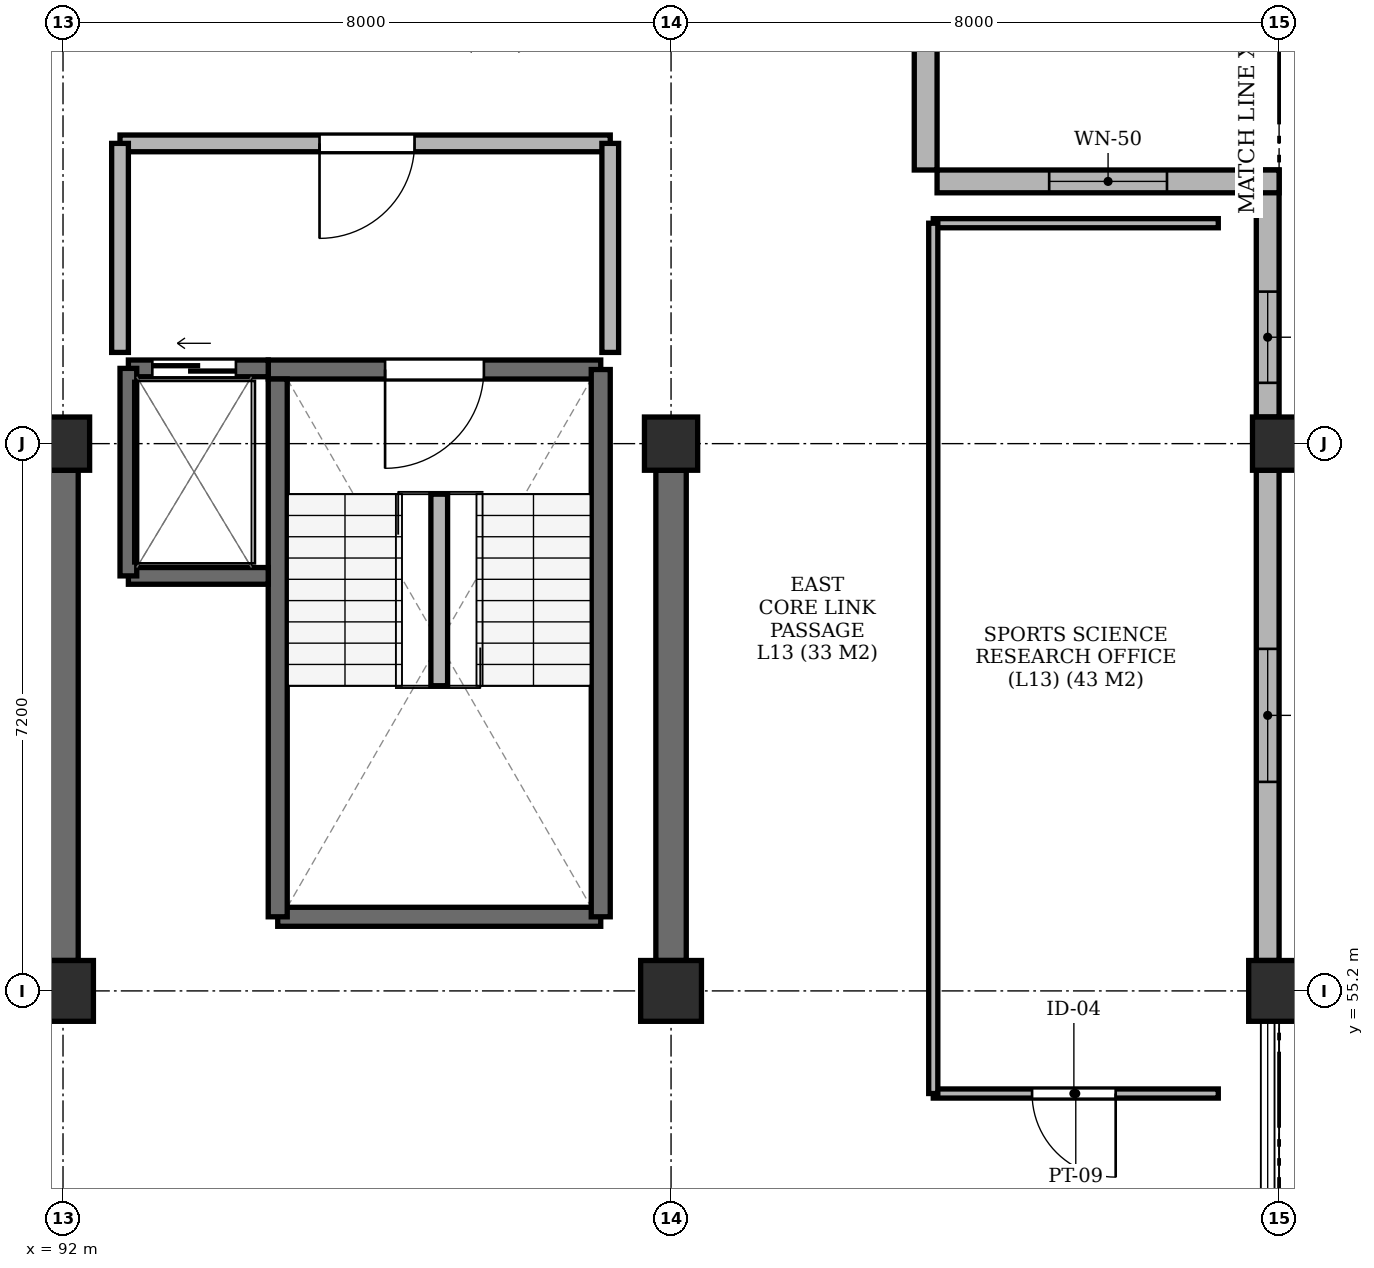
"""IFC4 building model, lengths in metres.
Left out: names, types, materials, properties, quantities, classifications, styles, units other than length and angle.
Written with IfcOpenShell. Run it as: python <this file> out.ifc"""

import sys

from ifc_helpers import new_model, si_unit, direction, frame, frame_2d, origin, origin_2d, place, context, subcontext, project, spatial, rectangle, extrude, element, fill, save


model = new_model("IFC4")
c1 = context("Model", 3, precision=1e-05, world=origin(), true_north=direction((0.0, 1.0)))
c2 = subcontext(c1, "Body", "Model", "MODEL_VIEW")
j1 = project(units=[si_unit("LENGTHUNIT", "METRE"), si_unit("PLANEANGLEUNIT", "RADIAN")], contexts=[c1])
p1 = place(None, origin())
s1 = spatial("IfcSite", under=j1, at=p1, CompositionType="ELEMENT")
p2 = place(p1, origin())
s2 = spatial("IfcBuilding", under=s1, at=p2, CompositionType="ELEMENT")
p3 = place(p2, frame((0.0, 0.0, 53.55)))
s3 = spatial("IfcBuildingStorey", under=s2, at=p3, CompositionType="ELEMENT", Elevation=53.55)
p4 = place(p3, frame((92.0, 55.2, -0.22), z_axis=(0.0, 0.0, 1.0), x_axis=(1.0, 0.0, 0.0)))
e1 = element("IfcColumn", 1, at=p4, inside=s3, PredefinedType="COLUMN", context=c2, shape_type="SweptSolid", body=[
    extrude(rectangle(XDim=0.8, YDim=0.8, at=origin_2d()), origin(), (0.0, 0.0, 1.0), 3.25),
])
p5 = place(p3, frame((92.0, 62.4, -0.22), z_axis=(0.0, 0.0, 1.0), x_axis=(1.0, 0.0, 0.0)))
e2 = element("IfcColumn", 2, at=p5, inside=s3, PredefinedType="COLUMN", context=c2, shape_type="SweptSolid", body=[
    extrude(rectangle(XDim=0.7, YDim=0.7, at=origin_2d()), origin(), (0.0, 0.0, 1.0), 3.25),
])
p6 = place(p3, frame((100.0, 55.2, -0.22), z_axis=(0.0, 0.0, 1.0), x_axis=(1.0, 0.0, 0.0)))
e3 = element("IfcColumn", 3, at=p6, inside=s3, PredefinedType="COLUMN", context=c2, shape_type="SweptSolid", body=[
    extrude(rectangle(XDim=0.8, YDim=0.8, at=origin_2d()), origin(), (0.0, 0.0, 1.0), 3.25),
])
p7 = place(p3, frame((100.0, 62.4, -0.22), z_axis=(0.0, 0.0, 1.0), x_axis=(1.0, 0.0, 0.0)))
e4 = element("IfcColumn", 4, at=p7, inside=s3, PredefinedType="COLUMN", context=c2, shape_type="SweptSolid", body=[
    extrude(rectangle(XDim=0.7, YDim=0.7, at=origin_2d()), origin(), (0.0, 0.0, 1.0), 3.25),
])
p8 = place(p3, frame((108.0, 55.2, -0.22), z_axis=(0.0, 0.0, 1.0), x_axis=(1.0, 0.0, 0.0)))
e5 = element("IfcColumn", 5, at=p8, inside=s3, PredefinedType="COLUMN", context=c2, shape_type="SweptSolid", body=[
    extrude(rectangle(XDim=0.8, YDim=0.8, at=origin_2d()), origin(), (0.0, 0.0, 1.0), 3.25),
])
p9 = place(p3, frame((108.0, 62.4, -0.22), z_axis=(0.0, 0.0, 1.0), x_axis=(1.0, 0.0, 0.0)))
e6 = element("IfcColumn", 6, at=p9, inside=s3, PredefinedType="COLUMN", context=c2, shape_type="SweptSolid", body=[
    extrude(rectangle(XDim=0.7, YDim=0.7, at=origin_2d()), origin(), (0.0, 0.0, 1.0), 3.25),
])
for number, where, z_axis, x_axis in (
    (7, (92.0, 55.6, 0.0), (0.0, 0.0, 1.0), (0.0, 1.0, 0.0)),
    (8, (100.0, 55.6, 0.0), (0.0, 0.0, 1.0), (0.0, 1.0, 0.0)),
):
    element("IfcWall", number, at=place(p3, frame(where, z_axis=z_axis, x_axis=x_axis)), inside=s3, PredefinedType="SHEAR", context=c2, shape_type="SweptSolid", body=[
        extrude(rectangle(XDim=6.45, YDim=0.4, at=frame_2d((3.225, 0.0))), origin(), (0.0, 0.0, 1.0), 3.03),
    ])
p10 = place(p3, frame((107.85, 55.6, 0.0), z_axis=(0.0, 0.0, 1.0), x_axis=(0.0, 1.0, 0.0)))
e9 = element("IfcWall", 9, at=p10, inside=s3, PredefinedType="SOLIDWALL", context=c2, shape_type="SweptSolid", body=[
    extrude(rectangle(XDim=6.45, YDim=0.3, at=frame_2d((3.225, 0.0))), origin(), (0.0, 0.0, 1.0), 2.53),
])
p11 = place(p10, frame((2.35, 0.0, 0.62)))
e10 = element("IfcOpeningElement", 10, at=p11, cuts=e9, PredefinedType="OPENING", context=c2, shape_type="SweptSolid", body=[
    extrude(rectangle(XDim=1.75, YDim=1.81, at=frame_2d((0.875, 0.905))), frame((0.0, 0.162, 0.0), z_axis=(0.0, -1.0, 0.0), x_axis=(1.0, 0.0, 0.0)), (0.0, 0.0, 1.0), 0.324),
])
p12 = place(p3, frame((107.85, 62.75, 0.0), z_axis=(0.0, 0.0, 1.0), x_axis=(0.0, 1.0, 0.0)))
e11 = element("IfcWall", 11, at=p12, inside=s3, PredefinedType="SOLIDWALL", context=c2, shape_type="SweptSolid", body=[
    extrude(rectangle(XDim=3.25, YDim=0.3, at=frame_2d((1.625, 0.0))), origin(), (0.0, 0.0, 1.0), 2.53),
])
p13 = place(p12, frame((0.45, 0.0, 0.62)))
e12 = element("IfcOpeningElement", 12, at=p13, cuts=e11, PredefinedType="OPENING", context=c2, shape_type="SweptSolid", body=[
    extrude(rectangle(XDim=1.2, YDim=1.65, at=frame_2d((0.6, 0.825))), frame((0.0, 0.162, 0.0), z_axis=(0.0, -1.0, 0.0), x_axis=(1.0, 0.0, 0.0)), (0.0, 0.0, 1.0), 0.324),
])
p14 = place(p3, frame((108.0, 65.85, 0.0), z_axis=(0.0, 0.0, 1.0), x_axis=(-1.0, 0.0, 0.0)))
e13 = element("IfcWall", 13, at=p14, inside=s3, PredefinedType="SOLIDWALL", context=c2, shape_type="SweptSolid", body=[
    extrude(rectangle(XDim=4.5, YDim=0.3, at=frame_2d((2.25, 0.0))), origin(), (0.0, 0.0, 1.0), 2.53),
])
p15 = place(p14, frame((1.475, 0.0, 0.62)))
e14 = element("IfcOpeningElement", 14, at=p15, cuts=e13, PredefinedType="OPENING", context=c2, shape_type="SweptSolid", body=[
    extrude(rectangle(XDim=1.55, YDim=1.81, at=frame_2d((0.775, 0.905))), frame((0.0, 0.162, 0.0), z_axis=(0.0, -1.0, 0.0), x_axis=(1.0, 0.0, 0.0)), (0.0, 0.0, 1.0), 0.324),
])
p16 = place(p3, frame((103.35, 66.0, 0.0), z_axis=(0.0, 0.0, 1.0), x_axis=(0.0, 1.0, 0.0)))
e15 = element("IfcWall", 15, at=p16, inside=s3, PredefinedType="SOLIDWALL", context=c2, shape_type="SweptSolid", body=[
    extrude(rectangle(XDim=3.6, YDim=0.3, at=frame_2d((1.8, 0.0))), origin(), (0.0, 0.0, 1.0), 2.53),
])
p17 = place(p3, frame((94.825, 56.175, 0.0), z_axis=(0.0, 0.0, 1.0), x_axis=(1.0, 0.0, 0.0)))
e16 = element("IfcWall", 16, at=p17, inside=s3, PredefinedType="SHEAR", context=c2, shape_type="SweptSolid", body=[
    extrude(rectangle(XDim=4.25, YDim=0.25, at=frame_2d((2.125, 0.0))), origin(), (0.0, 0.0, 1.0), 3.03),
])
p18 = place(p3, frame((99.075, 63.375, 0.0), z_axis=(0.0, 0.0, 1.0), x_axis=(-1.0, 0.0, 0.0)))
e17 = element("IfcWall", 17, at=p18, inside=s3, PredefinedType="SHEAR", context=c2, shape_type="SweptSolid", body=[
    extrude(rectangle(XDim=4.375, YDim=0.25, at=frame_2d((2.188, 0.0))), origin(), (0.0, 0.0, 1.0), 3.03),
])
p19 = place(p18, frame((1.538, 0.0, 0.0)))
e18 = element("IfcOpeningElement", 18, at=p19, cuts=e17, PredefinedType="OPENING", context=c2, shape_type="SweptSolid", body=[
    extrude(rectangle(XDim=1.3, YDim=2.2, at=frame_2d((0.65, 1.1))), frame((0.0, 0.137, 0.0), z_axis=(0.0, -1.0, 0.0), x_axis=(1.0, 0.0, 0.0)), (0.0, 0.0, 1.0), 0.274),
])
p20 = place(p3, frame((94.825, 63.25, 0.0), z_axis=(0.0, 0.0, 1.0), x_axis=(0.0, -1.0, 0.0)))
e19 = element("IfcWall", 19, at=p20, inside=s3, PredefinedType="SHEAR", context=c2, shape_type="SweptSolid", body=[
    extrude(rectangle(XDim=7.075, YDim=0.25, at=frame_2d((3.538, 0.0))), origin(), (0.0, 0.0, 1.0), 3.03),
])
p21 = place(p3, frame((99.075, 56.175, 0.0), z_axis=(0.0, 0.0, 1.0), x_axis=(0.0, 1.0, 0.0)))
e20 = element("IfcWall", 20, at=p21, inside=s3, PredefinedType="SHEAR", context=c2, shape_type="SweptSolid", body=[
    extrude(rectangle(XDim=7.2, YDim=0.25, at=frame_2d((3.6, 0.0))), origin(), (0.0, 0.0, 1.0), 3.03),
])
p22 = place(p3, frame((96.95, 59.215, 0.0), z_axis=(0.0, 0.0, 1.0), x_axis=(0.0, 1.0, 0.0)))
e21 = element("IfcWall", 21, at=p22, inside=s3, PredefinedType="PARTITIONING", context=c2, shape_type="SweptSolid", body=[
    extrude(rectangle(XDim=2.52, YDim=0.22, at=frame_2d((1.26, 0.0))), origin(), (0.0, 0.0, 1.0), 3.03),
])
p23 = place(p3, frame((92.86, 60.66, 0.0), z_axis=(0.0, 0.0, 1.0), x_axis=(1.0, 0.0, 0.0)))
e22 = element("IfcWall", 22, at=p23, inside=s3, PredefinedType="SHEAR", context=c2, shape_type="SweptSolid", body=[
    extrude(rectangle(XDim=1.84, YDim=0.22, at=frame_2d((0.92, 0.0))), origin(), (0.0, 0.0, 1.0), 3.03),
])
p24 = place(p3, frame((94.7, 63.39, 0.0), z_axis=(0.0, 0.0, 1.0), x_axis=(-1.0, 0.0, 0.0)))
e23 = element("IfcWall", 23, at=p24, inside=s3, PredefinedType="SHEAR", context=c2, shape_type="SweptSolid", body=[
    extrude(rectangle(XDim=1.84, YDim=0.22, at=frame_2d((0.92, 0.0))), origin(), (0.0, 0.0, 1.0), 3.03),
])
p25 = place(p24, frame((0.425, 0.0, 0.0)))
e24 = element("IfcOpeningElement", 24, at=p25, cuts=e23, PredefinedType="OPENING", context=c2, shape_type="SweptSolid", body=[
    extrude(rectangle(XDim=1.1, YDim=2.2, at=frame_2d((0.55, 1.1))), frame((0.0, 0.122, 0.0), z_axis=(0.0, -1.0, 0.0), x_axis=(1.0, 0.0, 0.0)), (0.0, 0.0, 1.0), 0.244),
])
p26 = place(p3, frame((92.86, 63.39, 0.0), z_axis=(0.0, 0.0, 1.0), x_axis=(0.0, -1.0, 0.0)))
e25 = element("IfcWall", 25, at=p26, inside=s3, PredefinedType="SHEAR", context=c2, shape_type="SweptSolid", body=[
    extrude(rectangle(XDim=2.73, YDim=0.22, at=frame_2d((1.365, 0.0))), origin(), (0.0, 0.0, 1.0), 3.03),
])
p27 = place(p3, frame((92.75, 66.35, 0.0), z_axis=(0.0, 0.0, 1.0), x_axis=(1.0, 0.0, 0.0)))
e26 = element("IfcWall", 26, at=p27, inside=s3, PredefinedType="PARTITIONING", context=c2, shape_type="SweptSolid", body=[
    extrude(rectangle(XDim=6.45, YDim=0.22, at=frame_2d((3.225, 0.0))), origin(), (0.0, 0.0, 1.0), 2.53),
])
p28 = place(p27, frame((2.625, 0.0, 0.0)))
e27 = element("IfcOpeningElement", 27, at=p28, cuts=e26, PredefinedType="OPENING", context=c2, shape_type="SweptSolid", body=[
    extrude(rectangle(XDim=1.25, YDim=2.2, at=frame_2d((0.625, 1.1))), frame((0.0, 0.122, 0.0), z_axis=(0.0, -1.0, 0.0), x_axis=(1.0, 0.0, 0.0)), (0.0, 0.0, 1.0), 0.244),
])
for number, where, z_axis, x_axis in (
    (28, (92.75, 63.6, 0.0), (0.0, 0.0, 1.0), (0.0, 1.0, 0.0)),
    (29, (99.2, 63.6, 0.0), (0.0, 0.0, 1.0), (0.0, 1.0, 0.0)),
):
    element("IfcWall", number, at=place(p3, frame(where, z_axis=z_axis, x_axis=x_axis)), inside=s3, PredefinedType="PARTITIONING", context=c2, shape_type="SweptSolid", body=[
        extrude(rectangle(XDim=2.75, YDim=0.22, at=frame_2d((1.375, 0.0))), origin(), (0.0, 0.0, 1.0), 2.53),
    ])
p29 = place(p3, frame((103.45, 53.85, 0.0), z_axis=(0.0, 0.0, 1.0), x_axis=(1.0, 0.0, 0.0)))
e30 = element("IfcWall", 30, at=p29, inside=s3, PredefinedType="PARTITIONING", context=c2, shape_type="SweptSolid", body=[
    extrude(rectangle(XDim=3.75, YDim=0.12, at=frame_2d((1.875, 0.0))), origin(), (0.0, 0.0, 1.0), 2.53),
])
p30 = place(p29, frame((1.3, 0.0, 0.0)))
e31 = element("IfcOpeningElement", 31, at=p30, cuts=e30, PredefinedType="OPENING", context=c2, shape_type="SweptSolid", body=[
    extrude(rectangle(XDim=1.1, YDim=2.15, at=frame_2d((0.55, 1.075))), frame((0.0, 0.072, 0.0), z_axis=(0.0, -1.0, 0.0), x_axis=(1.0, 0.0, 0.0)), (0.0, 0.0, 1.0), 0.144),
])
p31 = place(p3, frame((103.45, 65.3, 0.0), z_axis=(0.0, 0.0, 1.0), x_axis=(1.0, 0.0, 0.0)))
e32 = element("IfcWall", 32, at=p31, inside=s3, PredefinedType="PARTITIONING", context=c2, shape_type="SweptSolid", body=[
    extrude(rectangle(XDim=3.75, YDim=0.12, at=frame_2d((1.875, 0.0))), origin(), (0.0, 0.0, 1.0), 2.53),
])
p32 = place(p3, frame((103.45, 53.85, 0.0), z_axis=(0.0, 0.0, 1.0), x_axis=(0.0, 1.0, 0.0)))
e33 = element("IfcWall", 33, at=p32, inside=s3, PredefinedType="PARTITIONING", context=c2, shape_type="SweptSolid", body=[
    extrude(rectangle(XDim=11.45, YDim=0.12, at=frame_2d((5.725, 0.0))), origin(), (0.0, 0.0, 1.0), 2.53),
])
p33 = place(p11, origin())
e34 = element("IfcWindow", 34, at=p33, inside=s3, PartitioningType="SINGLE_PANEL", PredefinedType="WINDOW", context=c2, shape_type="SweptSolid", body=[
    extrude(rectangle(XDim=1.75, YDim=1.81, at=frame_2d((0.875, 0.905))), frame((0.0, 0.03, 0.0), z_axis=(0.0, -1.0, 0.0), x_axis=(1.0, 0.0, 0.0)), (0.0, 0.0, 1.0), 0.06),
])
fill(e10, e34)
p34 = place(p13, origin())
e35 = element("IfcWindow", 35, at=p34, inside=s3, PartitioningType="SINGLE_PANEL", PredefinedType="WINDOW", context=c2, shape_type="SweptSolid", body=[
    extrude(rectangle(XDim=1.2, YDim=1.65, at=frame_2d((0.6, 0.825))), frame((0.0, 0.03, 0.0), z_axis=(0.0, -1.0, 0.0), x_axis=(1.0, 0.0, 0.0)), (0.0, 0.0, 1.0), 0.06),
])
fill(e12, e35)
p35 = place(p15, origin())
e36 = element("IfcWindow", 36, at=p35, inside=s3, PartitioningType="SINGLE_PANEL", PredefinedType="WINDOW", context=c2, shape_type="SweptSolid", body=[
    extrude(rectangle(XDim=1.55, YDim=1.81, at=frame_2d((0.775, 0.905))), frame((0.0, 0.03, 0.0), z_axis=(0.0, -1.0, 0.0), x_axis=(1.0, 0.0, 0.0)), (0.0, 0.0, 1.0), 0.06),
])
fill(e14, e36)
p36 = place(p19, origin())
e37 = element("IfcDoor", 37, at=p36, inside=s3, OperationType="SINGLE_SWING_RIGHT", PredefinedType="DOOR", context=c2, shape_type="SweptSolid", body=[
    extrude(rectangle(XDim=1.3, YDim=2.2, at=frame_2d((0.65, 1.1))), frame((0.0, 0.025, 0.0), z_axis=(0.0, -1.0, 0.0), x_axis=(1.0, 0.0, 0.0)), (0.0, 0.0, 1.0), 0.05),
])
fill(e18, e37)
p37 = place(p25, origin())
e38 = element("IfcDoor", 38, at=p37, inside=s3, OperationType="SLIDING_TO_RIGHT", PredefinedType="DOOR", context=c2, shape_type="SweptSolid", body=[
    extrude(rectangle(XDim=1.1, YDim=2.2, at=frame_2d((0.55, 1.1))), frame((0.0, 0.025, 0.0), z_axis=(0.0, -1.0, 0.0), x_axis=(1.0, 0.0, 0.0)), (0.0, 0.0, 1.0), 0.05),
])
fill(e24, e38)
p38 = place(p28, frame((1.25, 0.0, 0.0), z_axis=(0.0, 0.0, 1.0), x_axis=(-1.0, 0.0, 0.0)))
e39 = element("IfcDoor", 39, at=p38, inside=s3, OperationType="SINGLE_SWING_LEFT", PredefinedType="DOOR", context=c2, shape_type="SweptSolid", body=[
    extrude(rectangle(XDim=1.25, YDim=2.2, at=frame_2d((0.625, 1.1))), frame((0.0, 0.025, 0.0), z_axis=(0.0, -1.0, 0.0), x_axis=(1.0, 0.0, 0.0)), (0.0, 0.0, 1.0), 0.05),
])
fill(e27, e39)
p39 = place(p30, frame((1.1, 0.0, 0.0), z_axis=(0.0, 0.0, 1.0), x_axis=(-1.0, 0.0, 0.0)))
e40 = element("IfcDoor", 40, at=p39, inside=s3, OperationType="SINGLE_SWING_RIGHT", PredefinedType="DOOR", context=c2, shape_type="SweptSolid", body=[
    extrude(rectangle(XDim=1.1, YDim=2.15, at=frame_2d((0.55, 1.075))), frame((0.0, 0.025, 0.0), z_axis=(0.0, -1.0, 0.0), x_axis=(1.0, 0.0, 0.0)), (0.0, 0.0, 1.0), 0.05),
])
fill(e31, e40)
save(model, sys.argv[1])
